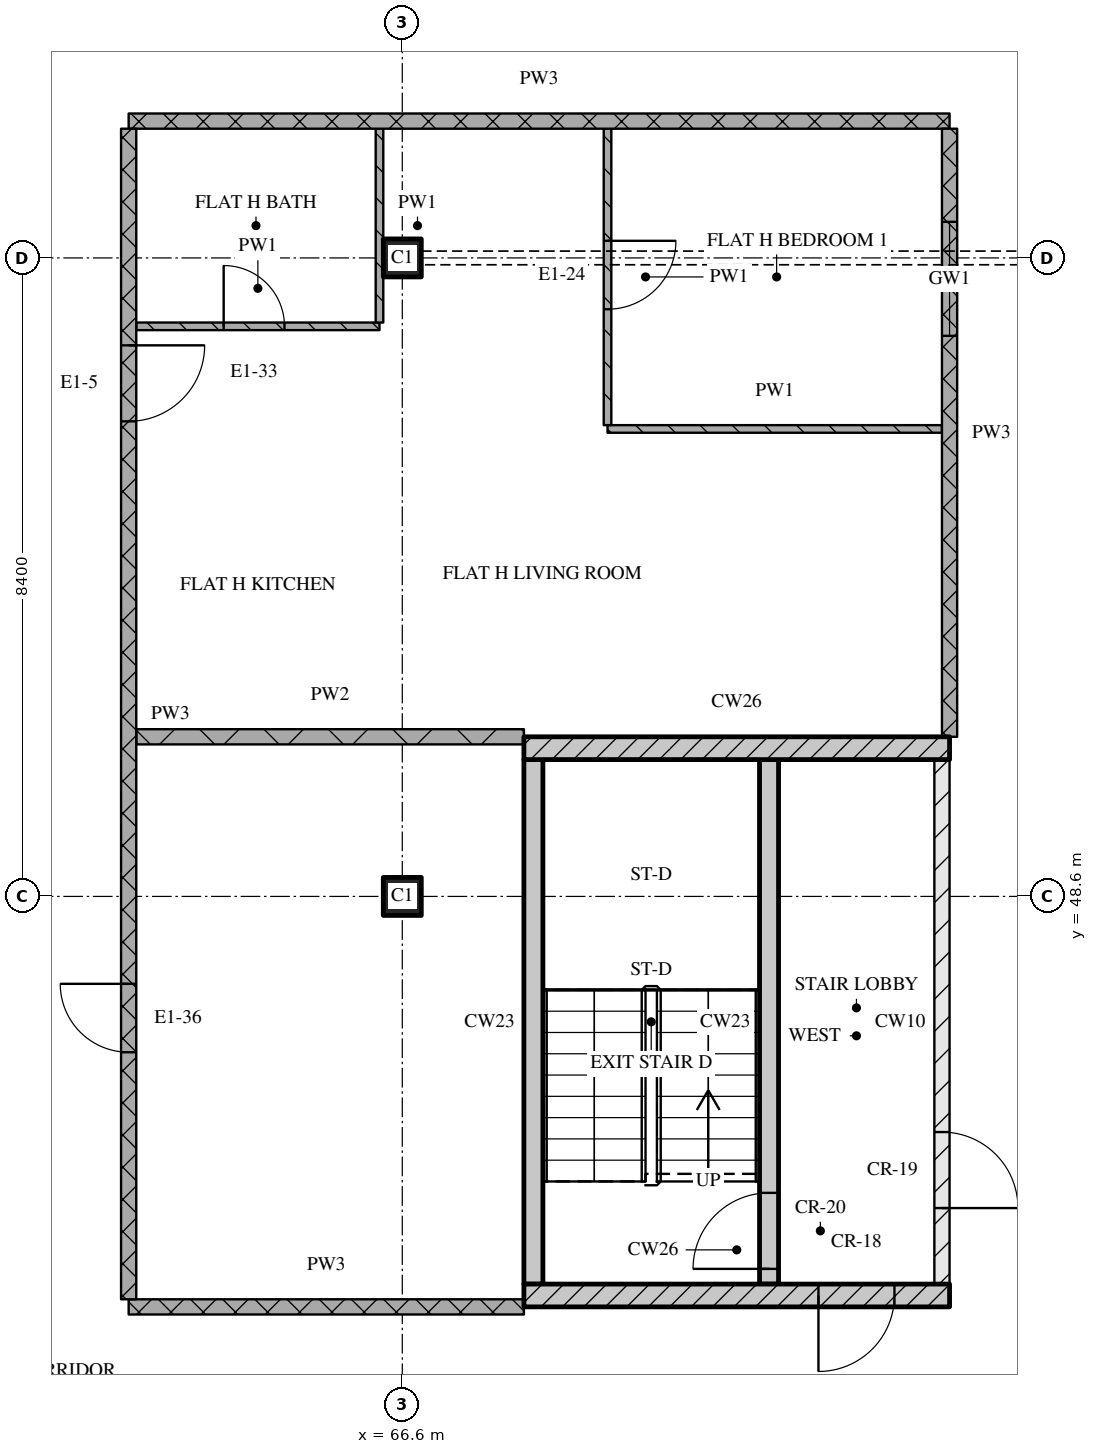
"""IFC4 building model, lengths in metres.
Left out: names, types, materials, properties, quantities, classifications, styles, units other than length and angle.
Written with IfcOpenShell. Run it as: python <this file> out.ifc"""

import sys

from ifc_helpers import new_model, si_unit, direction, frame, frame_2d, origin, origin_2d, place, context, subcontext, project, spatial, rectangle, extrude, element, fill, save


model = new_model("IFC4")
c1 = context("Model", 3, precision=1e-05, world=origin(), true_north=direction((0.0, 1.0)))
c2 = subcontext(c1, "Body", "Model", "MODEL_VIEW")
j1 = project(units=[si_unit("LENGTHUNIT", "METRE"), si_unit("PLANEANGLEUNIT", "RADIAN")], contexts=[c1])
p1 = place(None, origin())
s1 = spatial("IfcSite", under=j1, at=p1, CompositionType="ELEMENT")
p2 = place(p1, origin())
s2 = spatial("IfcBuilding", under=s1, at=p2, CompositionType="ELEMENT")
p3 = place(p2, frame((0.0, 0.0, 267.15)))
s3 = spatial("IfcBuildingStorey", under=s2, at=p3, CompositionType="ELEMENT", Elevation=267.15)
for number, where, z_axis, x_axis in (
    (1, (66.6, 48.6, 0.0), (0.0, 0.0, 1.0), (1.0, 0.0, 0.0)),
    (2, (66.6, 57.0, 0.0), (0.0, 0.0, 1.0), (1.0, 0.0, 0.0)),
):
    element("IfcColumn", number, at=place(p3, frame(where, z_axis=z_axis, x_axis=x_axis)), inside=s3, PredefinedType="COLUMN", context=c2, shape_type="SweptSolid", body=[
        extrude(rectangle(XDim=0.5, YDim=0.5, at=origin_2d()), origin(), (0.0, 0.0, 1.0), 3.6),
    ])
p4 = place(p3, frame((68.2, 43.35, 0.0), z_axis=(0.0, 0.0, 1.0), x_axis=(1.0, 0.0, 0.0)))
e3 = element("IfcWall", 3, at=p4, inside=s3, PredefinedType="SOLIDWALL", context=c2, shape_type="SweptSolid", body=[
    extrude(rectangle(XDim=5.6, YDim=0.3, at=frame_2d((2.8, 0.0))), origin(), (0.0, 0.0, 1.0), 3.32),
])
p5 = place(p4, frame((3.875, 0.0, 0.0)))
e4 = element("IfcOpeningElement", 4, at=p5, cuts=e3, PredefinedType="OPENING", context=c2, shape_type="SweptSolid", body=[
    extrude(rectangle(XDim=1.0, YDim=2.1, at=frame_2d((0.5, 1.05))), frame((0.0, 0.16, 0.0), z_axis=(0.0, -1.0, 0.0), x_axis=(1.0, 0.0, 0.0)), (0.0, 0.0, 1.0), 0.32),
])
p6 = place(p3, frame((68.325, 43.5, 0.0), z_axis=(0.0, 0.0, 1.0), x_axis=(0.0, 1.0, 0.0)))
e5 = element("IfcWall", 5, at=p6, inside=s3, PredefinedType="SOLIDWALL", context=c2, shape_type="SweptSolid", body=[
    extrude(rectangle(XDim=6.9, YDim=0.25, at=frame_2d((3.45, 0.0))), origin(), (0.0, 0.0, 1.0), 3.32),
])
p7 = place(p3, frame((71.425, 43.5, 0.0), z_axis=(0.0, 0.0, 1.0), x_axis=(0.0, 1.0, 0.0)))
e6 = element("IfcWall", 6, at=p7, inside=s3, PredefinedType="SOLIDWALL", context=c2, shape_type="SweptSolid", body=[
    extrude(rectangle(XDim=6.9, YDim=0.25, at=frame_2d((3.45, 0.0))), origin(), (0.0, 0.0, 1.0), 3.32),
])
p8 = place(p7, frame((0.2, 0.0, 0.0)))
e7 = element("IfcOpeningElement", 7, at=p8, cuts=e6, PredefinedType="OPENING", context=c2, shape_type="SweptSolid", body=[
    extrude(rectangle(XDim=1.0, YDim=2.1, at=frame_2d((0.5, 1.05))), frame((0.0, 0.135, 0.0), z_axis=(0.0, -1.0, 0.0), x_axis=(1.0, 0.0, 0.0)), (0.0, 0.0, 1.0), 0.27),
])
p9 = place(p3, frame((73.7, 43.5, 0.0), z_axis=(0.0, 0.0, 1.0), x_axis=(0.0, 1.0, 0.0)))
e8 = element("IfcWall", 8, at=p9, inside=s3, PredefinedType="PARTITIONING", context=c2, shape_type="SweptSolid", body=[
    extrude(rectangle(XDim=6.9, YDim=0.2, at=frame_2d((3.45, 0.0))), origin(), (0.0, 0.0, 1.0), 3.32),
])
p10 = place(p9, frame((1.0, 0.0, 0.0)))
e9 = element("IfcOpeningElement", 9, at=p10, cuts=e8, PredefinedType="OPENING", context=c2, shape_type="SweptSolid", body=[
    extrude(rectangle(XDim=1.0, YDim=2.1, at=frame_2d((0.5, 1.05))), frame((0.0, 0.11, 0.0), z_axis=(0.0, -1.0, 0.0), x_axis=(1.0, 0.0, 0.0)), (0.0, 0.0, 1.0), 0.22),
])
p11 = place(p3, frame((68.2, 50.55, 0.0), z_axis=(0.0, 0.0, 1.0), x_axis=(1.0, 0.0, 0.0)))
e10 = element("IfcWall", 10, at=p11, inside=s3, PredefinedType="SOLIDWALL", context=c2, shape_type="SweptSolid", body=[
    extrude(rectangle(XDim=5.6, YDim=0.3, at=frame_2d((2.8, 0.0))), origin(), (0.0, 0.0, 1.0), 3.32),
])
p12 = place(p3, frame((63.0, 43.2, 0.0), z_axis=(0.0, 0.0, 1.0), x_axis=(1.0, 0.0, 0.0)))
e11 = element("IfcWall", 11, at=p12, inside=s3, PredefinedType="PARTITIONING", context=c2, shape_type="SweptSolid", body=[
    extrude(rectangle(XDim=5.2, YDim=0.2, at=frame_2d((2.6, 0.0))), origin(), (0.0, 0.0, 1.0), 3.32),
])
p13 = place(p3, frame((63.1, 50.7, 0.0), z_axis=(0.0, 0.0, 1.0), x_axis=(1.0, 0.0, 0.0)))
e12 = element("IfcWall", 12, at=p13, inside=s3, PredefinedType="PARTITIONING", context=c2, shape_type="SweptSolid", body=[
    extrude(rectangle(XDim=5.1, YDim=0.2, at=frame_2d((2.55, 0.0))), origin(), (0.0, 0.0, 1.0), 3.32),
])
p14 = place(p3, frame((69.3, 54.75, 0.0), z_axis=(0.0, 0.0, 1.0), x_axis=(1.0, 0.0, 0.0)))
e13 = element("IfcWall", 13, at=p14, inside=s3, PredefinedType="PARTITIONING", context=c2, shape_type="SweptSolid", body=[
    extrude(rectangle(XDim=4.4, YDim=0.1, at=frame_2d((2.2, 0.0))), origin(), (0.0, 0.0, 1.0), 3.32),
])
p15 = place(p3, frame((63.1, 56.1, 0.0), z_axis=(0.0, 0.0, 1.0), x_axis=(1.0, 0.0, 0.0)))
e14 = element("IfcWall", 14, at=p15, inside=s3, PredefinedType="PARTITIONING", context=c2, shape_type="SweptSolid", body=[
    extrude(rectangle(XDim=3.2, YDim=0.1, at=frame_2d((1.6, 0.0))), origin(), (0.0, 0.0, 1.0), 3.32),
])
p16 = place(p15, frame((1.15, 0.0, 0.0)))
e15 = element("IfcOpeningElement", 15, at=p16, cuts=e14, PredefinedType="OPENING", context=c2, shape_type="SweptSolid", body=[
    extrude(rectangle(XDim=0.8, YDim=2.1, at=frame_2d((0.4, 1.05))), frame((0.0, 0.06, 0.0), z_axis=(0.0, -1.0, 0.0), x_axis=(1.0, 0.0, 0.0)), (0.0, 0.0, 1.0), 0.12),
])
p17 = place(p3, frame((63.0, 58.8, 0.0), z_axis=(0.0, 0.0, 1.0), x_axis=(1.0, 0.0, 0.0)))
e16 = element("IfcWall", 16, at=p17, inside=s3, PredefinedType="PARTITIONING", context=c2, shape_type="SweptSolid", body=[
    extrude(rectangle(XDim=10.8, YDim=0.2, at=frame_2d((5.4, 0.0))), origin(), (0.0, 0.0, 1.0), 3.32),
])
p18 = place(p3, frame((63.0, 58.7, 0.0), z_axis=(0.0, 0.0, 1.0), x_axis=(0.0, -1.0, 0.0)))
e17 = element("IfcWall", 17, at=p18, inside=s3, PredefinedType="PARTITIONING", context=c2, shape_type="SweptSolid", body=[
    extrude(rectangle(XDim=15.4, YDim=0.2, at=frame_2d((7.7, 0.0))), origin(), (0.0, 0.0, 1.0), 3.32),
])
p19 = place(p18, frame((2.85, 0.0, 0.0)))
e18 = element("IfcOpeningElement", 18, at=p19, cuts=e17, PredefinedType="OPENING", context=c2, shape_type="SweptSolid", body=[
    extrude(rectangle(XDim=1.0, YDim=2.1, at=frame_2d((0.5, 1.05))), frame((0.0, 0.11, 0.0), z_axis=(0.0, -1.0, 0.0), x_axis=(1.0, 0.0, 0.0)), (0.0, 0.0, 1.0), 0.22),
])
p20 = place(p18, frame((11.25, 0.0, 0.0)))
e19 = element("IfcOpeningElement", 19, at=p20, cuts=e17, PredefinedType="OPENING", context=c2, shape_type="SweptSolid", body=[
    extrude(rectangle(XDim=0.9, YDim=2.1, at=frame_2d((0.45, 1.05))), frame((0.0, 0.11, 0.0), z_axis=(0.0, -1.0, 0.0), x_axis=(1.0, 0.0, 0.0)), (0.0, 0.0, 1.0), 0.22),
])
p21 = place(p3, frame((66.3, 58.7, 0.0), z_axis=(0.0, 0.0, 1.0), x_axis=(0.0, -1.0, 0.0)))
e20 = element("IfcWall", 20, at=p21, inside=s3, PredefinedType="PARTITIONING", context=c2, shape_type="SweptSolid", body=[
    extrude(rectangle(XDim=2.55, YDim=0.1, at=frame_2d((1.275, 0.0))), origin(), (0.0, 0.0, 1.0), 3.32),
])
p22 = place(p3, frame((69.3, 58.7, 0.0), z_axis=(0.0, 0.0, 1.0), x_axis=(0.0, -1.0, 0.0)))
e21 = element("IfcWall", 21, at=p22, inside=s3, PredefinedType="PARTITIONING", context=c2, shape_type="SweptSolid", body=[
    extrude(rectangle(XDim=3.9, YDim=0.1, at=frame_2d((1.95, 0.0))), origin(), (0.0, 0.0, 1.0), 3.32),
])
p23 = place(p22, frame((1.475, 0.0, 0.0)))
e22 = element("IfcOpeningElement", 22, at=p23, cuts=e21, PredefinedType="OPENING", context=c2, shape_type="SweptSolid", body=[
    extrude(rectangle(XDim=0.9, YDim=2.1, at=frame_2d((0.45, 1.05))), frame((0.0, 0.06, 0.0), z_axis=(0.0, -1.0, 0.0), x_axis=(1.0, 0.0, 0.0)), (0.0, 0.0, 1.0), 0.12),
])
p24 = place(p3, frame((73.8, 58.7, 0.0), z_axis=(0.0, 0.0, 1.0), x_axis=(0.0, -1.0, 0.0)))
e23 = element("IfcWall", 23, at=p24, inside=s3, PredefinedType="PARTITIONING", context=c2, shape_type="SweptSolid", body=[
    extrude(rectangle(XDim=8.0, YDim=0.2, at=frame_2d((4.0, 0.0))), origin(), (0.0, 0.0, 1.0), 3.32),
])
p25 = place(p24, frame((1.225, 0.0, 0.9)))
e24 = element("IfcOpeningElement", 24, at=p25, cuts=e23, PredefinedType="OPENING", context=c2, shape_type="SweptSolid", body=[
    extrude(rectangle(XDim=1.5, YDim=1.5, at=frame_2d((0.75, 0.75))), frame((0.0, 0.11, 0.0), z_axis=(0.0, -1.0, 0.0), x_axis=(1.0, 0.0, 0.0)), (0.0, 0.0, 1.0), 0.22),
])
p26 = place(p5, origin())
e25 = element("IfcDoor", 25, at=p26, inside=s3, OperationType="SINGLE_SWING_RIGHT", PredefinedType="DOOR", context=c2, shape_type="SweptSolid", body=[
    extrude(rectangle(XDim=1.0, YDim=2.1, at=frame_2d((0.5, 1.05))), frame((0.0, 0.025, 0.0), z_axis=(0.0, -1.0, 0.0), x_axis=(1.0, 0.0, 0.0)), (0.0, 0.0, 1.0), 0.05),
])
fill(e4, e25)
p27 = place(p8, origin())
e26 = element("IfcDoor", 26, at=p27, inside=s3, OperationType="SINGLE_SWING_LEFT", PredefinedType="DOOR", context=c2, shape_type="SweptSolid", body=[
    extrude(rectangle(XDim=1.0, YDim=2.1, at=frame_2d((0.5, 1.05))), frame((0.0, 0.025, 0.0), z_axis=(0.0, -1.0, 0.0), x_axis=(1.0, 0.0, 0.0)), (0.0, 0.0, 1.0), 0.05),
])
fill(e7, e26)
p28 = place(p10, origin())
e27 = element("IfcDoor", 27, at=p28, inside=s3, OperationType="SINGLE_SWING_RIGHT", PredefinedType="DOOR", context=c2, shape_type="SweptSolid", body=[
    extrude(rectangle(XDim=1.0, YDim=2.1, at=frame_2d((0.5, 1.05))), frame((0.0, 0.025, 0.0), z_axis=(0.0, -1.0, 0.0), x_axis=(1.0, 0.0, 0.0)), (0.0, 0.0, 1.0), 0.05),
])
fill(e9, e27)
p29 = place(p16, origin())
e28 = element("IfcDoor", 28, at=p29, inside=s3, OperationType="SINGLE_SWING_LEFT", PredefinedType="DOOR", context=c2, shape_type="SweptSolid", body=[
    extrude(rectangle(XDim=0.8, YDim=2.1, at=frame_2d((0.4, 1.05))), frame((0.0, 0.025, 0.0), z_axis=(0.0, -1.0, 0.0), x_axis=(1.0, 0.0, 0.0)), (0.0, 0.0, 1.0), 0.05),
])
fill(e15, e28)
p30 = place(p19, origin())
e29 = element("IfcDoor", 29, at=p30, inside=s3, OperationType="SINGLE_SWING_LEFT", PredefinedType="DOOR", context=c2, shape_type="SweptSolid", body=[
    extrude(rectangle(XDim=1.0, YDim=2.1, at=frame_2d((0.5, 1.05))), frame((0.0, 0.025, 0.0), z_axis=(0.0, -1.0, 0.0), x_axis=(1.0, 0.0, 0.0)), (0.0, 0.0, 1.0), 0.05),
])
fill(e18, e29)
p31 = place(p20, origin())
e30 = element("IfcDoor", 30, at=p31, inside=s3, OperationType="SINGLE_SWING_RIGHT", PredefinedType="DOOR", context=c2, shape_type="SweptSolid", body=[
    extrude(rectangle(XDim=0.9, YDim=2.1, at=frame_2d((0.45, 1.05))), frame((0.0, 0.025, 0.0), z_axis=(0.0, -1.0, 0.0), x_axis=(1.0, 0.0, 0.0)), (0.0, 0.0, 1.0), 0.05),
])
fill(e19, e30)
p32 = place(p23, origin())
e31 = element("IfcDoor", 31, at=p32, inside=s3, OperationType="SINGLE_SWING_LEFT", PredefinedType="DOOR", context=c2, shape_type="SweptSolid", body=[
    extrude(rectangle(XDim=0.9, YDim=2.1, at=frame_2d((0.45, 1.05))), frame((0.0, 0.025, 0.0), z_axis=(0.0, -1.0, 0.0), x_axis=(1.0, 0.0, 0.0)), (0.0, 0.0, 1.0), 0.05),
])
fill(e22, e31)
p33 = place(p25, origin())
e32 = element("IfcWindow", 32, at=p33, inside=s3, PartitioningType="SINGLE_PANEL", PredefinedType="WINDOW", context=c2, shape_type="SweptSolid", body=[
    extrude(rectangle(XDim=1.5, YDim=1.5, at=frame_2d((0.75, 0.75))), frame((0.0, 0.03, 0.0), z_axis=(0.0, -1.0, 0.0), x_axis=(1.0, 0.0, 0.0)), (0.0, 0.0, 1.0), 0.06),
])
fill(e24, e32)
save(model, sys.argv[1])
